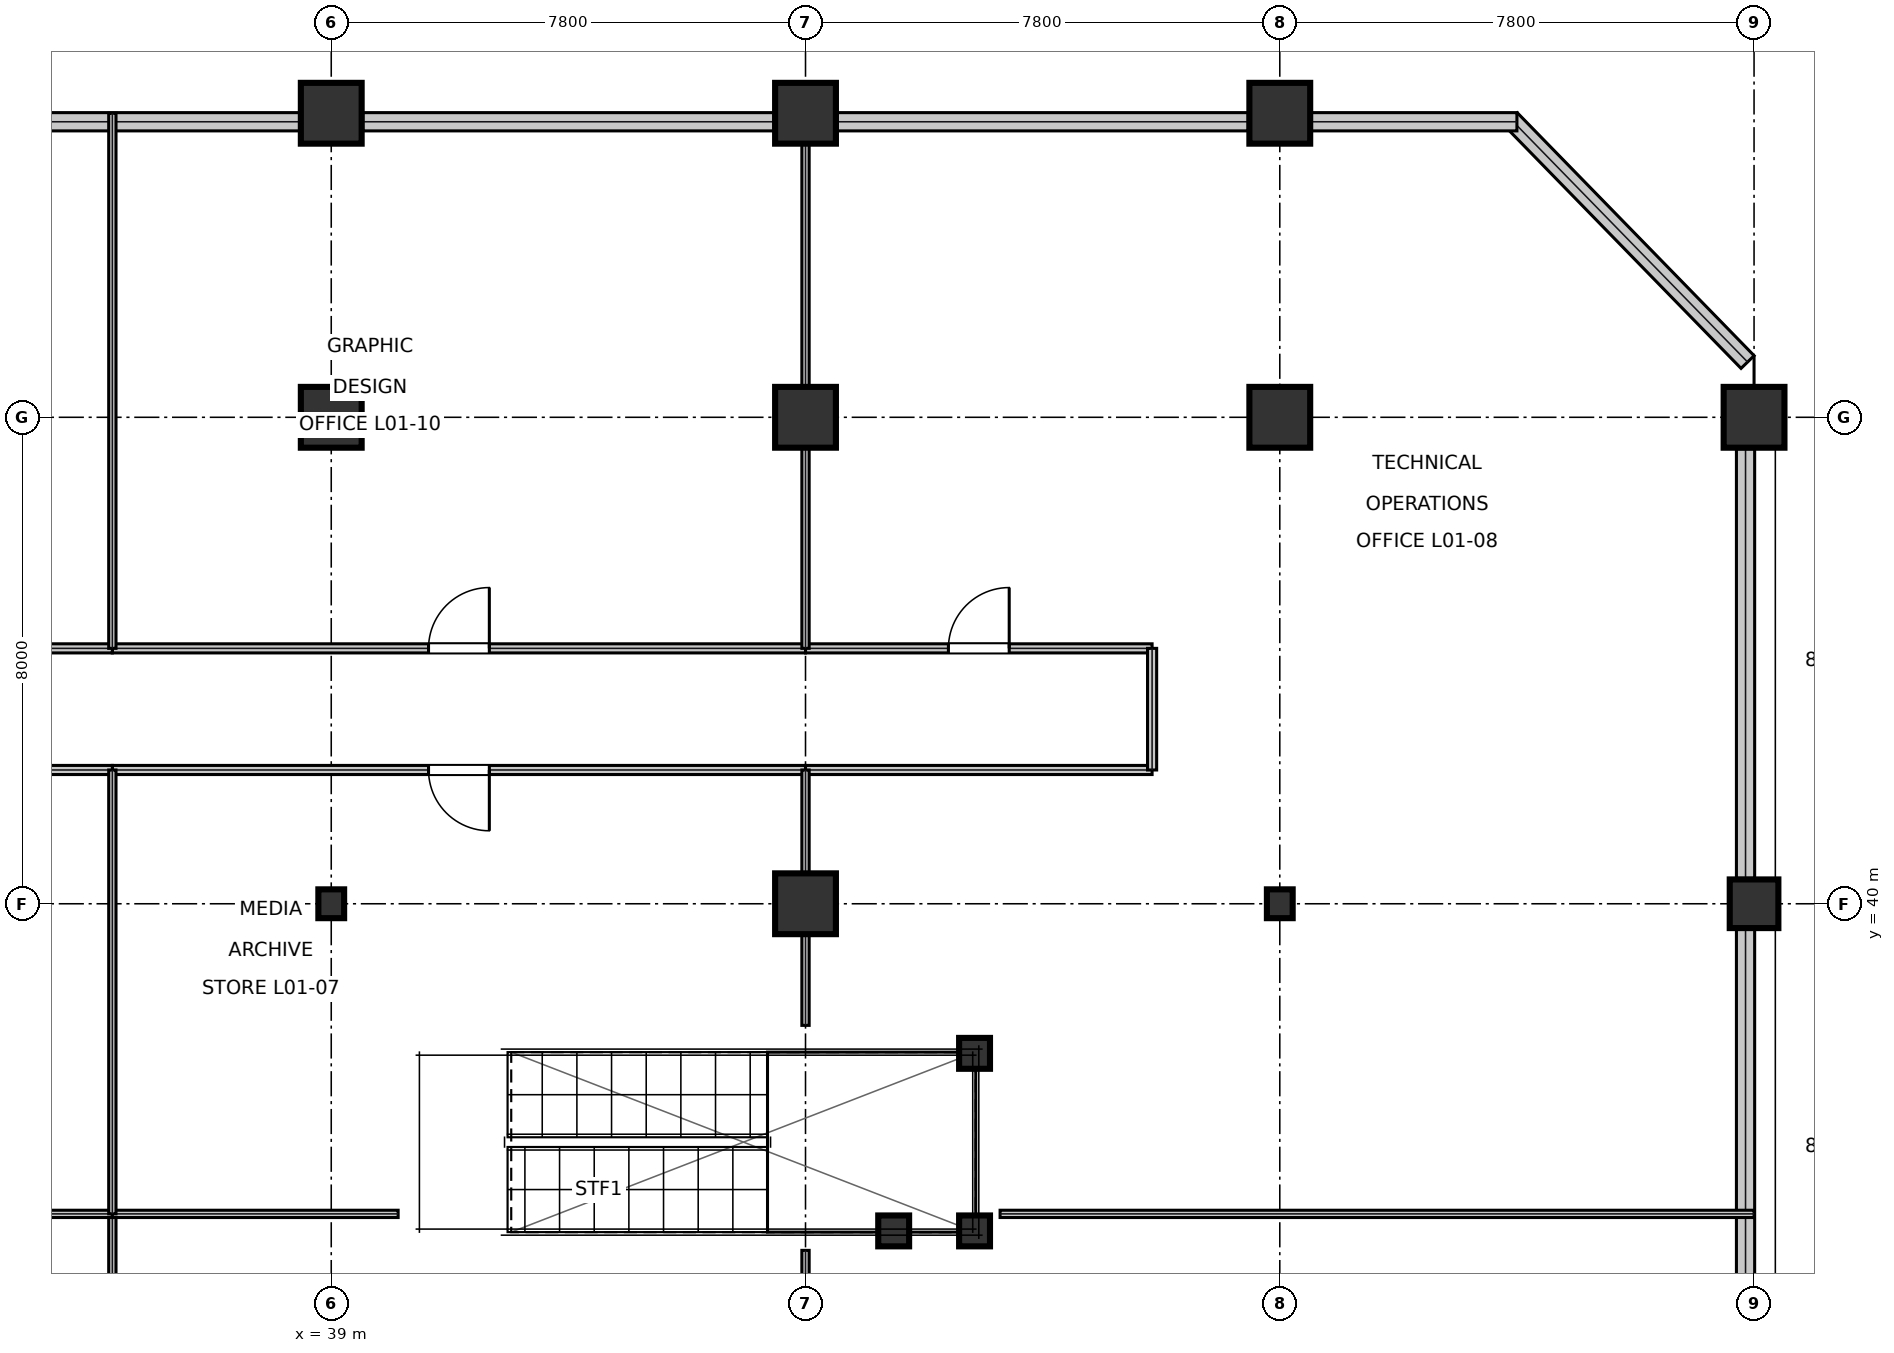
"""IFC4 building model, lengths in metres.
Left out: names, types, materials, properties, quantities, classifications, styles, units other than length and angle.
Written with IfcOpenShell. Run it as: python <this file> out.ifc"""

import sys

from ifc_helpers import new_model, si_unit, direction, frame, frame_2d, origin, origin_2d, place, context, subcontext, project, spatial, rectangle, hollow_circle, i_section, extrude, element, fill, save


model = new_model("IFC4")
c1 = context("Model", 3, precision=1e-05, world=origin(), true_north=direction((0.0, 1.0)))
c2 = subcontext(c1, "Body", "Model", "MODEL_VIEW")
j1 = project(units=[si_unit("LENGTHUNIT", "METRE"), si_unit("PLANEANGLEUNIT", "RADIAN")], contexts=[c1])
p1 = place(None, origin())
s1 = spatial("IfcSite", under=j1, at=p1, CompositionType="ELEMENT")
p2 = place(p1, origin())
s2 = spatial("IfcBuilding", under=s1, at=p2, CompositionType="ELEMENT")
p3 = place(p2, frame((0.0, 0.0, 5.4)))
s3 = spatial("IfcBuildingStorey", under=s2, at=p3, CompositionType="ELEMENT", Elevation=5.4)
p4 = place(p3, frame((39.0, 40.0, 0.0), z_axis=(0.0, 0.0, 1.0), x_axis=(1.0, 0.0, 0.0)))
e1 = element("IfcColumn", 1, at=p4, inside=s3, PredefinedType="COLUMN", context=c2, shape_type="SweptSolid", body=[
    extrude(i_section(OverallWidth=0.424, OverallDepth=0.474, WebThickness=0.048, FlangeThickness=0.077, at=origin_2d()), origin(), (0.0, 0.0, 1.0), 5.395),
])
for number, where, z_axis, x_axis in (
    (2, (39.0, 48.0, 0.0), (0.0, 0.0, 1.0), (1.0, 0.0, 0.0)),
    (3, (39.0, 53.0, 0.0), (0.0, 0.0, 1.0), (1.0, 0.0, 0.0)),
    (4, (46.8, 40.0, 0.0), (0.0, 0.0, 1.0), (1.0, 0.0, 0.0)),
    (5, (46.8, 48.0, 0.0), (0.0, 0.0, 1.0), (1.0, 0.0, 0.0)),
    (6, (46.8, 53.0, 0.0), (0.0, 0.0, 1.0), (1.0, 0.0, 0.0)),
):
    element("IfcColumn", number, at=place(p3, frame(where, z_axis=z_axis, x_axis=x_axis)), inside=s3, PredefinedType="COLUMN", context=c2, shape_type="SweptSolid", body=[
        extrude(rectangle(XDim=1.0, YDim=1.0, at=origin_2d()), origin(), (0.0, 0.0, 1.0), 5.395),
    ])
p5 = place(p3, frame((54.6, 40.0, 0.0), z_axis=(0.0, 0.0, 1.0), x_axis=(1.0, 0.0, 0.0)))
e7 = element("IfcColumn", 7, at=p5, inside=s3, PredefinedType="COLUMN", context=c2, shape_type="SweptSolid", body=[
    extrude(i_section(OverallWidth=0.424, OverallDepth=0.474, WebThickness=0.048, FlangeThickness=0.077, at=origin_2d()), origin(), (0.0, 0.0, 1.0), 5.395),
])
for number, where, z_axis, x_axis in (
    (8, (54.6, 48.0, 0.0), (0.0, 0.0, 1.0), (1.0, 0.0, 0.0)),
    (9, (54.6, 53.0, 0.0), (0.0, 0.0, 1.0), (1.0, 0.0, 0.0)),
):
    element("IfcColumn", number, at=place(p3, frame(where, z_axis=z_axis, x_axis=x_axis)), inside=s3, PredefinedType="COLUMN", context=c2, shape_type="SweptSolid", body=[
        extrude(rectangle(XDim=1.0, YDim=1.0, at=origin_2d()), origin(), (0.0, 0.0, 1.0), 5.395),
    ])
p6 = place(p3, frame((62.4, 40.0, 0.0), z_axis=(0.0, 0.0, 1.0), x_axis=(1.0, 0.0, 0.0)))
e10 = element("IfcColumn", 10, at=p6, inside=s3, PredefinedType="COLUMN", context=c2, shape_type="SweptSolid", body=[
    extrude(rectangle(XDim=0.8, YDim=0.8, at=origin_2d()), origin(), (0.0, 0.0, 1.0), 5.395),
])
p7 = place(p3, frame((62.4, 48.0, 0.0), z_axis=(0.0, 0.0, 1.0), x_axis=(1.0, 0.0, 0.0)))
e11 = element("IfcColumn", 11, at=p7, inside=s3, PredefinedType="COLUMN", context=c2, shape_type="SweptSolid", body=[
    extrude(rectangle(XDim=1.0, YDim=1.0, at=origin_2d()), origin(), (0.0, 0.0, 1.0), 5.395),
])
for number, where, z_axis, x_axis in (
    (12, (48.25, 34.62, 0.0), (0.0, 0.0, 1.0), (1.0, 0.0, 0.0)),
    (13, (49.58, 34.62, 0.0), (0.0, 0.0, 1.0), (1.0, 0.0, 0.0)),
    (14, (49.58, 37.54, 0.0), (0.0, 0.0, 1.0), (1.0, 0.0, 0.0)),
):
    element("IfcColumn", number, at=place(p3, frame(where, z_axis=z_axis, x_axis=x_axis)), inside=s3, PredefinedType="COLUMN", context=c2, shape_type="SweptSolid", body=[
        extrude(hollow_circle(Radius=0.254, WallThickness=0.02, at=origin_2d()), origin(), (0.0, 0.0, 1.0), 5.394),
    ])
for number, where, z_axis, x_axis in (
    (15, (62.26, 32.518, 0.0), (0.0, 0.0, 1.0), (0.0, 1.0, 0.0)),
    (16, (62.26, 40.418, 0.0), (0.0, 0.0, 1.0), (0.0, 1.0, 0.0)),
):
    element("IfcWall", number, at=place(p3, frame(where, z_axis=z_axis, x_axis=x_axis)), inside=s3, PredefinedType="STANDARD", context=c2, shape_type="SweptSolid", body=[
        extrude(rectangle(XDim=7.064, YDim=0.3, at=frame_2d((3.532, 0.0))), origin(), (0.0, 0.0, 1.0), 4.648),
    ])
p8 = place(p3, frame((62.293, 48.909, 0.0), z_axis=(0.0, 0.0, 1.0), x_axis=(-0.698076573741, 0.716023112193, 0.0)))
e17 = element("IfcWall", 17, at=p8, inside=s3, PredefinedType="STANDARD", context=c2, shape_type="SweptSolid", body=[
    extrude(rectangle(XDim=5.578, YDim=0.3, at=frame_2d((2.789, 0.0))), origin(), (0.0, 0.0, 1.0), 5.12),
])
p9 = place(p3, frame((58.5, 52.86, 0.0), z_axis=(0.0, 0.0, 1.0), x_axis=(-1.0, 0.0, 0.0)))
e18 = element("IfcWall", 18, at=p9, inside=s3, PredefinedType="STANDARD", context=c2, shape_type="SweptSolid", body=[
    extrude(rectangle(XDim=3.382, YDim=0.3, at=frame_2d((1.691, 0.0))), origin(), (0.0, 0.0, 1.0), 5.12),
])
for number, where, z_axis, x_axis in (
    (19, (54.082, 52.86, 0.0), (0.0, 0.0, 1.0), (-1.0, 0.0, 0.0)),
    (20, (46.282, 52.86, 0.0), (0.0, 0.0, 1.0), (-1.0, 0.0, 0.0)),
    (21, (38.482, 52.86, 0.0), (0.0, 0.0, 1.0), (-1.0, 0.0, 0.0)),
):
    element("IfcWall", number, at=place(p3, frame(where, z_axis=z_axis, x_axis=x_axis)), inside=s3, PredefinedType="STANDARD", context=c2, shape_type="SweptSolid", body=[
        extrude(rectangle(XDim=6.764, YDim=0.3, at=frame_2d((3.382, 0.0))), origin(), (0.0, 0.0, 1.0), 4.648),
    ])
p10 = place(p3, frame((35.4, 42.2, 0.0), z_axis=(0.0, 0.0, 1.0), x_axis=(1.0, 0.0, 0.0)))
e22 = element("IfcWall", 22, at=p10, inside=s3, PredefinedType="PARTITIONING", context=c2, shape_type="SweptSolid", body=[
    extrude(rectangle(XDim=11.4, YDim=0.15, at=frame_2d((5.7, 0.0))), origin(), (0.0, 0.0, 1.0), 4.415),
])
p11 = place(p10, frame((5.2, 0.0, 0.0)))
e23 = element("IfcOpeningElement", 23, at=p11, cuts=e22, PredefinedType="OPENING", context=c2, shape_type="SweptSolid", body=[
    extrude(rectangle(XDim=1.0, YDim=2.15, at=frame_2d((0.5, 1.075))), frame((0.0, 0.085, 0.0), z_axis=(0.0, -1.0, 0.0), x_axis=(1.0, 0.0, 0.0)), (0.0, 0.0, 1.0), 0.17),
])
p12 = place(p3, frame((46.8, 44.2, 0.0), z_axis=(0.0, 0.0, 1.0), x_axis=(1.0, 0.0, 0.0)))
e24 = element("IfcWall", 24, at=p12, inside=s3, PredefinedType="PARTITIONING", context=c2, shape_type="SweptSolid", body=[
    extrude(rectangle(XDim=5.7, YDim=0.15, at=frame_2d((2.85, 0.0))), origin(), (0.0, 0.0, 1.0), 4.415),
])
p13 = place(p12, frame((2.35, 0.0, 0.0)))
e25 = element("IfcOpeningElement", 25, at=p13, cuts=e24, PredefinedType="OPENING", context=c2, shape_type="SweptSolid", body=[
    extrude(rectangle(XDim=1.0, YDim=2.15, at=frame_2d((0.5, 1.075))), frame((0.0, 0.085, 0.0), z_axis=(0.0, -1.0, 0.0), x_axis=(1.0, 0.0, 0.0)), (0.0, 0.0, 1.0), 0.17),
])
p14 = place(p3, frame((35.4, 44.2, 0.0), z_axis=(0.0, 0.0, 1.0), x_axis=(1.0, 0.0, 0.0)))
e26 = element("IfcWall", 26, at=p14, inside=s3, PredefinedType="PARTITIONING", context=c2, shape_type="SweptSolid", body=[
    extrude(rectangle(XDim=11.4, YDim=0.15, at=frame_2d((5.7, 0.0))), origin(), (0.0, 0.0, 1.0), 4.415),
])
p15 = place(p14, frame((5.2, 0.0, 0.0)))
e27 = element("IfcOpeningElement", 27, at=p15, cuts=e26, PredefinedType="OPENING", context=c2, shape_type="SweptSolid", body=[
    extrude(rectangle(XDim=1.0, YDim=2.15, at=frame_2d((0.5, 1.075))), frame((0.0, 0.085, 0.0), z_axis=(0.0, -1.0, 0.0), x_axis=(1.0, 0.0, 0.0)), (0.0, 0.0, 1.0), 0.17),
])
p16 = place(p3, frame((28.2, 42.2, 0.0), z_axis=(0.0, 0.0, 1.0), x_axis=(1.0, 0.0, 0.0)))
e28 = element("IfcWall", 28, at=p16, inside=s3, PredefinedType="PARTITIONING", context=c2, shape_type="SweptSolid", body=[
    extrude(rectangle(XDim=7.2, YDim=0.15, at=frame_2d((3.6, 0.0))), origin(), (0.0, 0.0, 1.0), 4.415),
])
p17 = place(p3, frame((46.8, 42.2, 0.0), z_axis=(0.0, 0.0, 1.0), x_axis=(1.0, 0.0, 0.0)))
e29 = element("IfcWall", 29, at=p17, inside=s3, PredefinedType="PARTITIONING", context=c2, shape_type="SweptSolid", body=[
    extrude(rectangle(XDim=5.7, YDim=0.15, at=frame_2d((2.85, 0.0))), origin(), (0.0, 0.0, 1.0), 4.415),
])
p18 = place(p3, frame((52.5, 42.2, 0.0), z_axis=(0.0, 0.0, 1.0), x_axis=(0.0, 1.0, 0.0)))
e30 = element("IfcWall", 30, at=p18, inside=s3, PredefinedType="PARTITIONING", context=c2, shape_type="SweptSolid", body=[
    extrude(rectangle(XDim=2.0, YDim=0.15, at=frame_2d((1.0, 0.0))), origin(), (0.0, 0.0, 1.0), 4.701),
])
p19 = place(p3, frame((28.2, 44.2, 0.0), z_axis=(0.0, 0.0, 1.0), x_axis=(1.0, 0.0, 0.0)))
e31 = element("IfcWall", 31, at=p19, inside=s3, PredefinedType="PARTITIONING", context=c2, shape_type="SweptSolid", body=[
    extrude(rectangle(XDim=7.2, YDim=0.15, at=frame_2d((3.6, 0.0))), origin(), (0.0, 0.0, 1.0), 4.415),
])
p20 = place(p3, frame((46.8, 32.4, 0.0), z_axis=(0.0, 0.0, 1.0), x_axis=(0.0, 1.0, 0.0)))
e32 = element("IfcWall", 32, at=p20, inside=s3, PredefinedType="PARTITIONING", context=c2, shape_type="SweptSolid", body=[
    extrude(rectangle(XDim=1.9, YDim=0.12, at=frame_2d((0.95, 0.0))), origin(), (0.0, 0.0, 1.0), 5.12),
])
p21 = place(p3, frame((50.0, 34.9, 0.0), z_axis=(0.0, 0.0, 1.0), x_axis=(1.0, 0.0, 0.0)))
e33 = element("IfcWall", 33, at=p21, inside=s3, PredefinedType="PARTITIONING", context=c2, shape_type="SweptSolid", body=[
    extrude(rectangle(XDim=12.4, YDim=0.12, at=frame_2d((6.2, 0.0))), origin(), (0.0, 0.0, 1.0), 4.415),
])
p22 = place(p3, frame((35.4, 28.2, 0.0), z_axis=(0.0, 0.0, 1.0), x_axis=(0.0, 1.0, 0.0)))
e34 = element("IfcWall", 34, at=p22, inside=s3, PredefinedType="PARTITIONING", context=c2, shape_type="SweptSolid", body=[
    extrude(rectangle(XDim=6.7, YDim=0.12, at=frame_2d((3.35, 0.0))), origin(), (0.0, 0.0, 1.0), 4.338),
])
p23 = place(p3, frame((28.2, 34.9, 0.0), z_axis=(0.0, 0.0, 1.0), x_axis=(1.0, 0.0, 0.0)))
e35 = element("IfcWall", 35, at=p23, inside=s3, PredefinedType="PARTITIONING", context=c2, shape_type="SweptSolid", body=[
    extrude(rectangle(XDim=7.2, YDim=0.12, at=frame_2d((3.6, 0.0))), origin(), (0.0, 0.0, 1.0), 4.415),
])
p24 = place(p3, frame((35.4, 34.9, 0.0), z_axis=(0.0, 0.0, 1.0), x_axis=(1.0, 0.0, 0.0)))
e36 = element("IfcWall", 36, at=p24, inside=s3, PredefinedType="PARTITIONING", context=c2, shape_type="SweptSolid", body=[
    extrude(rectangle(XDim=4.7, YDim=0.12, at=frame_2d((2.35, 0.0))), origin(), (0.0, 0.0, 1.0), 4.415),
])
p25 = place(p3, frame((35.4, 34.9, 0.0), z_axis=(0.0, 0.0, 1.0), x_axis=(0.0, 1.0, 0.0)))
e37 = element("IfcWall", 37, at=p25, inside=s3, PredefinedType="PARTITIONING", context=c2, shape_type="SweptSolid", body=[
    extrude(rectangle(XDim=7.3, YDim=0.12, at=frame_2d((3.65, 0.0))), origin(), (0.0, 0.0, 1.0), 4.338),
])
p26 = place(p3, frame((46.8, 38.0, 0.0), z_axis=(0.0, 0.0, 1.0), x_axis=(0.0, 1.0, 0.0)))
e38 = element("IfcWall", 38, at=p26, inside=s3, PredefinedType="PARTITIONING", context=c2, shape_type="SweptSolid", body=[
    extrude(rectangle(XDim=4.2, YDim=0.12, at=frame_2d((2.1, 0.0))), origin(), (0.0, 0.0, 1.0), 4.338),
])
for number, where, z_axis, x_axis in (
    (39, (46.8, 44.2, 0.0), (0.0, 0.0, 1.0), (0.0, 1.0, 0.0)),
    (40, (35.4, 44.2, 0.0), (0.0, 0.0, 1.0), (0.0, 1.0, 0.0)),
):
    element("IfcWall", number, at=place(p3, frame(where, z_axis=z_axis, x_axis=x_axis)), inside=s3, PredefinedType="PARTITIONING", context=c2, shape_type="SweptSolid", body=[
        extrude(rectangle(XDim=8.8, YDim=0.12, at=frame_2d((4.4, 0.0))), origin(), (0.0, 0.0, 1.0), 4.338),
    ])
p27 = place(p11, frame((1.0, 0.0, 0.0), z_axis=(0.0, 0.0, 1.0), x_axis=(-1.0, 0.0, 0.0)))
e41 = element("IfcDoor", 41, at=p27, inside=s3, OperationType="SINGLE_SWING_LEFT", PredefinedType="DOOR", context=c2, shape_type="SweptSolid", body=[
    extrude(rectangle(XDim=1.0, YDim=2.15, at=frame_2d((0.5, 1.075))), frame((0.0, 0.025, 0.0), z_axis=(0.0, -1.0, 0.0), x_axis=(1.0, 0.0, 0.0)), (0.0, 0.0, 1.0), 0.05),
])
fill(e23, e41)
p28 = place(p13, origin())
e42 = element("IfcDoor", 42, at=p28, inside=s3, OperationType="SINGLE_SWING_RIGHT", PredefinedType="DOOR", context=c2, shape_type="SweptSolid", body=[
    extrude(rectangle(XDim=1.0, YDim=2.15, at=frame_2d((0.5, 1.075))), frame((0.0, 0.025, 0.0), z_axis=(0.0, -1.0, 0.0), x_axis=(1.0, 0.0, 0.0)), (0.0, 0.0, 1.0), 0.05),
])
fill(e25, e42)
p29 = place(p15, origin())
e43 = element("IfcDoor", 43, at=p29, inside=s3, OperationType="SINGLE_SWING_RIGHT", PredefinedType="DOOR", context=c2, shape_type="SweptSolid", body=[
    extrude(rectangle(XDim=1.0, YDim=2.15, at=frame_2d((0.5, 1.075))), frame((0.0, 0.025, 0.0), z_axis=(0.0, -1.0, 0.0), x_axis=(1.0, 0.0, 0.0)), (0.0, 0.0, 1.0), 0.05),
])
fill(e27, e43)
save(model, sys.argv[1])
